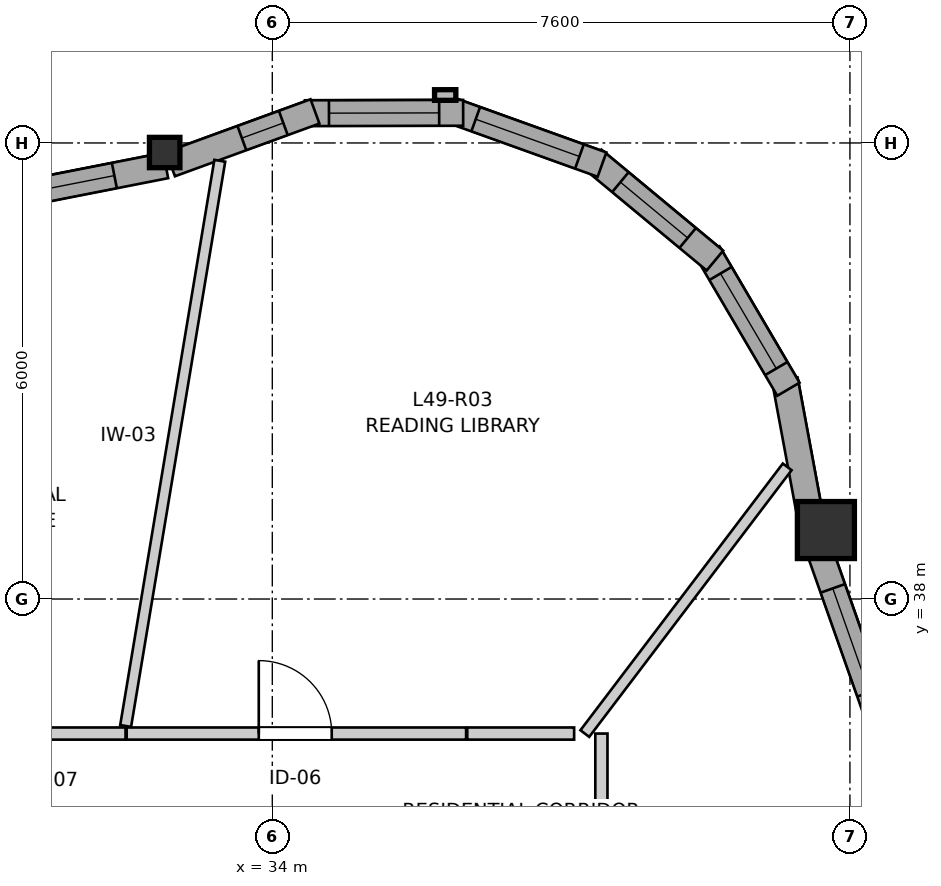
"""IFC4 building model, lengths in metres.
Left out: names, types, materials, properties, quantities, classifications, styles, units other than length and angle.
Written with IfcOpenShell. Run it as: python <this file> out.ifc"""

import sys

from ifc_helpers import new_model, si_unit, direction, frame, frame_2d, origin, origin_2d, place, context, subcontext, project, spatial, rectangle, i_section, extrude, source, transform, mapped, element, fill, save


model = new_model("IFC4")
c1 = context("Model", 3, precision=1e-05, world=origin(), true_north=direction((0.0, 1.0)))
c2 = subcontext(c1, "Body", "Model", "MODEL_VIEW")
j1 = project(units=[si_unit("LENGTHUNIT", "METRE"), si_unit("PLANEANGLEUNIT", "RADIAN")], contexts=[c1])
p1 = place(None, origin())
s1 = spatial("IfcSite", under=j1, at=p1, CompositionType="ELEMENT")
p2 = place(p1, origin())
s2 = spatial("IfcBuilding", under=s1, at=p2, CompositionType="ELEMENT")
p3 = place(p2, frame((0.0, 0.0, 165.0)))
s3 = spatial("IfcBuildingStorey", under=s2, at=p3, CompositionType="ELEMENT", Elevation=165.0)
m1 = source(origin(), c2, "Body", "SweptSolid", [
    extrude(rectangle(XDim=0.75, YDim=0.75, at=origin_2d()), origin(), (0.0, 0.0, 1.0), 2.95),
])
p4 = place(p3, frame((41.284, 38.907, 0.0), z_axis=(0.0, 0.0, 1.0), x_axis=(1.0, 0.0, 0.0)))
e1 = element("IfcColumn", 1, at=p4, inside=s3, PredefinedType="COLUMN", context=c2, shape_type="MappedRepresentation", body=[
    mapped(m1, transform((0.0, 0.0, 0.0), x_axis=(1.0, 0.0, 0.0), y_axis=(0.0, 1.0, 0.0), z_axis=(0.0, 0.0, 1.0), scale=1.0)),
])
m2 = source(origin(), c2, "Body", "SweptSolid", [
    extrude(i_section(OverallWidth=0.401, OverallDepth=0.399, WebThickness=0.023, FlangeThickness=0.036, FilletRadius=0.015, at=origin_2d()), origin(), (0.0, 0.0, 1.0), 2.95),
])
p5 = place(p3, frame((32.584, 43.874, 0.0), z_axis=(0.0, 0.0, 1.0), x_axis=(1.0, 0.0, 0.0)))
e2 = element("IfcColumn", 2, at=p5, inside=s3, PredefinedType="PILASTER", context=c2, shape_type="MappedRepresentation", body=[
    mapped(m2, transform((0.0, 0.0, 0.0), x_axis=(1.0, 0.0, 0.0), y_axis=(0.0, 1.0, 0.0), z_axis=(0.0, 0.0, 1.0), scale=1.0)),
])
p6 = place(p3, frame((42.059, 36.198, 0.0), z_axis=(0.0, 0.0, 1.0), x_axis=(-0.332714406781, 0.943027636668, 0.0)))
e3 = element("IfcWall", 3, at=p6, inside=s3, PredefinedType="SOLIDWALL", context=c2, shape_type="SweptSolid", body=[
    extrude(rectangle(XDim=2.658, YDim=0.34, at=frame_2d((1.329, 0.0))), origin(), (0.0, 0.0, 1.0), 2.53),
])
p7 = place(p6, frame((0.609, 0.0, 0.82)))
e4 = element("IfcOpeningElement", 4, at=p7, cuts=e3, PredefinedType="OPENING", context=c2, shape_type="SweptSolid", body=[
    extrude(rectangle(XDim=1.45, YDim=1.25, at=frame_2d((0.725, 0.625))), frame((0.0, 0.18, 0.0), z_axis=(0.0, -1.0, 0.0), x_axis=(1.0, 0.0, 0.0)), (0.0, 0.0, 1.0), 0.36),
])
p8 = place(p3, frame((41.088, 39.029, 0.0), z_axis=(0.0, 0.0, 1.0), x_axis=(-0.18244577317, 0.983215917209, 0.0)))
e5 = element("IfcWall", 5, at=p8, inside=s3, PredefinedType="SOLIDWALL", context=c2, shape_type="SweptSolid", body=[
    extrude(rectangle(XDim=1.888, YDim=0.34, at=frame_2d((0.944, 0.0))), origin(), (0.0, 0.0, 1.0), 2.53),
])
p9 = place(p3, frame((40.791, 40.76, 0.0), z_axis=(0.0, 0.0, 1.0), x_axis=(-0.506225227923, 0.862401309493, 0.0)))
e6 = element("IfcWall", 6, at=p9, inside=s3, PredefinedType="SOLIDWALL", context=c2, shape_type="SweptSolid", body=[
    extrude(rectangle(XDim=2.081, YDim=0.34, at=frame_2d((1.041, 0.0))), origin(), (0.0, 0.0, 1.0), 2.53),
])
p10 = place(p9, frame((0.315, 0.0, 0.82)))
e7 = element("IfcOpeningElement", 7, at=p10, cuts=e6, PredefinedType="OPENING", context=c2, shape_type="SweptSolid", body=[
    extrude(rectangle(XDim=1.45, YDim=1.25, at=frame_2d((0.725, 0.625))), frame((0.0, 0.18, 0.0), z_axis=(0.0, -1.0, 0.0), x_axis=(1.0, 0.0, 0.0)), (0.0, 0.0, 1.0), 0.36),
])
p11 = place(p3, frame((39.823, 42.453, 0.0), z_axis=(0.0, 0.0, 1.0), x_axis=(-0.769690471148, 0.63841724493, 0.0)))
e8 = element("IfcWall", 8, at=p11, inside=s3, PredefinedType="SOLIDWALL", context=c2, shape_type="SweptSolid", body=[
    extrude(rectangle(XDim=2.081, YDim=0.34, at=frame_2d((1.041, 0.0))), origin(), (0.0, 0.0, 1.0), 2.53),
])
p12 = place(p11, frame((0.466, 0.0, 0.82)))
e9 = element("IfcOpeningElement", 9, at=p12, cuts=e8, PredefinedType="OPENING", context=c2, shape_type="SweptSolid", body=[
    extrude(rectangle(XDim=1.15, YDim=1.2, at=frame_2d((0.575, 0.6))), frame((0.0, 0.18, 0.0), z_axis=(0.0, -1.0, 0.0), x_axis=(1.0, 0.0, 0.0)), (0.0, 0.0, 1.0), 0.36),
])
p13 = place(p3, frame((38.338, 43.715, 0.0), z_axis=(0.0, 0.0, 1.0), x_axis=(-0.941071215914, 0.338208466153, 0.0)))
e10 = element("IfcWall", 10, at=p13, inside=s3, PredefinedType="SOLIDWALL", context=c2, shape_type="SweptSolid", body=[
    extrude(rectangle(XDim=2.081, YDim=0.34, at=frame_2d((1.041, 0.0))), origin(), (0.0, 0.0, 1.0), 2.53),
])
p14 = place(p13, frame((0.315, 0.0, 0.82)))
e11 = element("IfcOpeningElement", 11, at=p14, cuts=e10, PredefinedType="OPENING", context=c2, shape_type="SweptSolid", body=[
    extrude(rectangle(XDim=1.45, YDim=1.25, at=frame_2d((0.725, 0.625))), frame((0.0, 0.18, 0.0), z_axis=(0.0, -1.0, 0.0), x_axis=(1.0, 0.0, 0.0)), (0.0, 0.0, 1.0), 0.36),
])
p15 = place(p3, frame((36.511, 44.396, 0.0), z_axis=(0.0, 0.0, 1.0), x_axis=(-0.999996965272, -0.002463624621, 0.0)))
e12 = element("IfcWall", 12, at=p15, inside=s3, PredefinedType="SOLIDWALL", context=c2, shape_type="SweptSolid", body=[
    extrude(rectangle(XDim=2.081, YDim=0.34, at=frame_2d((1.041, 0.0))), origin(), (0.0, 0.0, 1.0), 2.53),
])
p16 = place(p15, frame((0.316, 0.0, 0.82)))
e13 = element("IfcOpeningElement", 13, at=p16, cuts=e12, PredefinedType="OPENING", context=c2, shape_type="SweptSolid", body=[
    extrude(rectangle(XDim=1.45, YDim=1.25, at=frame_2d((0.725, 0.625))), frame((0.0, 0.18, 0.0), z_axis=(0.0, -1.0, 0.0), x_axis=(1.0, 0.0, 0.0)), (0.0, 0.0, 1.0), 0.36),
])
p17 = place(p3, frame((34.562, 44.415, 0.0), z_axis=(0.0, 0.0, 1.0), x_axis=(-0.939426417976, -0.342750645819, 0.0)))
e14 = element("IfcWall", 14, at=p17, inside=s3, PredefinedType="SOLIDWALL", context=c2, shape_type="SweptSolid", body=[
    extrude(rectangle(XDim=2.023, YDim=0.34, at=frame_2d((1.011, 0.0))), origin(), (0.0, 0.0, 1.0), 2.53),
])
p18 = place(p17, frame((0.444, 0.0, 0.82)))
e15 = element("IfcOpeningElement", 15, at=p18, cuts=e14, PredefinedType="OPENING", context=c2, shape_type="SweptSolid", body=[
    extrude(rectangle(XDim=0.58, YDim=1.35, at=frame_2d((0.29, 0.675))), frame((0.0, 0.18, 0.0), z_axis=(0.0, -1.0, 0.0), x_axis=(1.0, 0.0, 0.0)), (0.0, 0.0, 1.0), 0.36),
])
p19 = place(p3, frame((32.597, 43.704, 0.0), z_axis=(0.0, 0.0, 1.0), x_axis=(-0.981214876679, -0.192918028667, 0.0)))
e16 = element("IfcWall", 16, at=p19, inside=s3, PredefinedType="SOLIDWALL", context=c2, shape_type="SweptSolid", body=[
    extrude(rectangle(XDim=2.746, YDim=0.34, at=frame_2d((1.373, 0.0))), origin(), (0.0, 0.0, 1.0), 2.53),
])
p20 = place(p19, frame((0.688, 0.0, 0.82)))
e17 = element("IfcOpeningElement", 17, at=p20, cuts=e16, PredefinedType="OPENING", context=c2, shape_type="SweptSolid", body=[
    extrude(rectangle(XDim=1.35, YDim=1.45, at=frame_2d((0.675, 0.725))), frame((0.0, 0.18, 0.0), z_axis=(0.0, -1.0, 0.0), x_axis=(1.0, 0.0, 0.0)), (0.0, 0.0, 1.0), 0.36),
])
p21 = place(p3, frame((24.201, 36.23, 0.0), z_axis=(0.0, 0.0, 1.0), x_axis=(1.0, 0.0, 0.0)))
e18 = element("IfcWall", 18, at=p21, inside=s3, PredefinedType="PARTITIONING", context=c2, shape_type="SweptSolid", body=[
    extrude(rectangle(XDim=7.868, YDim=0.16, at=frame_2d((3.934, 0.0))), origin(), (0.0, 0.0, 1.0), 2.95),
])
p22 = place(p21, frame((3.456, 0.0, 0.0)))
e19 = element("IfcOpeningElement", 19, at=p22, cuts=e18, PredefinedType="OPENING", context=c2, shape_type="SweptSolid", body=[
    extrude(rectangle(XDim=0.96, YDim=2.1, at=frame_2d((0.48, 1.05))), frame((0.0, 0.09, 0.0), z_axis=(0.0, -1.0, 0.0), x_axis=(1.0, 0.0, 0.0)), (0.0, 0.0, 1.0), 0.18),
])
p23 = place(p3, frame((32.084, 36.23, 0.0), z_axis=(0.0, 0.0, 1.0), x_axis=(1.0, 0.0, 0.0)))
e20 = element("IfcWall", 20, at=p23, inside=s3, PredefinedType="PARTITIONING", context=c2, shape_type="SweptSolid", body=[
    extrude(rectangle(XDim=4.466, YDim=0.16, at=frame_2d((2.233, 0.0))), origin(), (0.0, 0.0, 1.0), 2.588),
])
p24 = place(p23, frame((1.738, 0.0, 0.0)))
e21 = element("IfcOpeningElement", 21, at=p24, cuts=e20, PredefinedType="OPENING", context=c2, shape_type="SweptSolid", body=[
    extrude(rectangle(XDim=0.96, YDim=2.1, at=frame_2d((0.48, 1.05))), frame((0.0, 0.09, 0.0), z_axis=(0.0, -1.0, 0.0), x_axis=(1.0, 0.0, 0.0)), (0.0, 0.0, 1.0), 0.18),
])
p25 = place(p3, frame((32.071, 36.33, 0.0), z_axis=(0.0, 0.0, 1.0), x_axis=(0.164299199522, 0.986410549942, 0.0)))
e22 = element("IfcWall", 22, at=p25, inside=s3, PredefinedType="PARTITIONING", context=c2, shape_type="SweptSolid", body=[
    extrude(rectangle(XDim=7.538, YDim=0.145, at=frame_2d((3.769, 0.0))), origin(), (0.0, 0.0, 1.0), 2.95),
])
p26 = place(p3, frame((38.112, 36.23, 0.0), z_axis=(0.0, 0.0, 1.0), x_axis=(0.604495658019, 0.796608435453, 0.0)))
e23 = element("IfcWall", 23, at=p26, inside=s3, PredefinedType="PARTITIONING", context=c2, shape_type="SweptSolid", body=[
    extrude(rectangle(XDim=4.405, YDim=0.145, at=frame_2d((2.202, 0.0))), origin(), (0.0, 0.0, 1.0), 2.95),
])
p27 = place(p3, frame((38.33, 34.465, 0.0), z_axis=(0.0, 0.0, 1.0), x_axis=(0.0, 1.0, 0.0)))
e24 = element("IfcWall", 24, at=p27, inside=s3, PredefinedType="PARTITIONING", context=c2, shape_type="SweptSolid", body=[
    extrude(rectangle(XDim=1.765, YDim=0.16, at=frame_2d((0.882, 0.0))), origin(), (0.0, 0.0, 1.0), 2.588),
])
p28 = place(p3, frame((36.565, 36.23, 0.0), z_axis=(0.0, 0.0, 1.0), x_axis=(1.0, 0.0, 0.0)))
e25 = element("IfcWall", 25, at=p28, inside=s3, PredefinedType="PARTITIONING", context=c2, shape_type="SweptSolid", body=[
    extrude(rectangle(XDim=1.406, YDim=0.16, at=frame_2d((0.703, 0.0))), origin(), (0.0, 0.0, 1.0), 2.95),
])
m3 = source(origin(), c2, "Body", "SweptSolid", [
    extrude(rectangle(XDim=1.45, YDim=1.25, at=frame_2d((0.725, 0.625))), frame((0.0, 0.03, 0.0), z_axis=(0.0, -1.0, 0.0), x_axis=(1.0, 0.0, 0.0)), (0.0, 0.0, 1.0), 0.06),
])
p29 = place(p7, origin())
e26 = element("IfcWindow", 26, at=p29, inside=s3, PartitioningType="SINGLE_PANEL", PredefinedType="WINDOW", context=c2, shape_type="MappedRepresentation", body=[
    mapped(m3, transform((0.0, 0.0, 0.0), x_axis=(1.0, 0.0, 0.0), y_axis=(0.0, 1.0, 0.0), z_axis=(0.0, 0.0, 1.0), scale=1.0)),
])
fill(e4, e26)
p30 = place(p10, origin())
e27 = element("IfcWindow", 27, at=p30, inside=s3, PartitioningType="SINGLE_PANEL", PredefinedType="WINDOW", context=c2, shape_type="MappedRepresentation", body=[
    mapped(m3, transform((0.0, 0.0, 0.0), x_axis=(1.0, 0.0, 0.0), y_axis=(0.0, 1.0, 0.0), z_axis=(0.0, 0.0, 1.0), scale=1.0)),
])
fill(e7, e27)
m4 = source(origin(), c2, "Body", "SweptSolid", [
    extrude(rectangle(XDim=1.15, YDim=1.2, at=frame_2d((0.575, 0.6))), frame((0.0, 0.03, 0.0), z_axis=(0.0, -1.0, 0.0), x_axis=(1.0, 0.0, 0.0)), (0.0, 0.0, 1.0), 0.06),
])
p31 = place(p12, origin())
e28 = element("IfcWindow", 28, at=p31, inside=s3, PartitioningType="SINGLE_PANEL", PredefinedType="WINDOW", context=c2, shape_type="MappedRepresentation", body=[
    mapped(m4, transform((0.0, 0.0, 0.0), x_axis=(1.0, 0.0, 0.0), y_axis=(0.0, 1.0, 0.0), z_axis=(0.0, 0.0, 1.0), scale=1.0)),
])
fill(e9, e28)
p32 = place(p14, origin())
e29 = element("IfcWindow", 29, at=p32, inside=s3, PartitioningType="SINGLE_PANEL", PredefinedType="WINDOW", context=c2, shape_type="MappedRepresentation", body=[
    mapped(m3, transform((0.0, 0.0, 0.0), x_axis=(1.0, 0.0, 0.0), y_axis=(0.0, 1.0, 0.0), z_axis=(0.0, 0.0, 1.0), scale=1.0)),
])
fill(e11, e29)
p33 = place(p16, origin())
e30 = element("IfcWindow", 30, at=p33, inside=s3, PartitioningType="SINGLE_PANEL", PredefinedType="WINDOW", context=c2, shape_type="MappedRepresentation", body=[
    mapped(m3, transform((0.0, 0.0, 0.0), x_axis=(1.0, 0.0, 0.0), y_axis=(0.0, 1.0, 0.0), z_axis=(0.0, 0.0, 1.0), scale=1.0)),
])
fill(e13, e30)
m5 = source(origin(), c2, "Body", "SweptSolid", [
    extrude(rectangle(XDim=0.58, YDim=1.35, at=frame_2d((0.29, 0.675))), frame((0.0, 0.03, 0.0), z_axis=(0.0, -1.0, 0.0), x_axis=(1.0, 0.0, 0.0)), (0.0, 0.0, 1.0), 0.06),
])
p34 = place(p18, origin())
e31 = element("IfcWindow", 31, at=p34, inside=s3, PartitioningType="SINGLE_PANEL", PredefinedType="WINDOW", context=c2, shape_type="MappedRepresentation", body=[
    mapped(m5, transform((0.0, 0.0, 0.0), x_axis=(1.0, 0.0, 0.0), y_axis=(0.0, 1.0, 0.0), z_axis=(0.0, 0.0, 1.0), scale=1.0)),
])
fill(e15, e31)
m6 = source(origin(), c2, "Body", "SweptSolid", [
    extrude(rectangle(XDim=1.35, YDim=1.45, at=frame_2d((0.675, 0.725))), frame((0.0, 0.03, 0.0), z_axis=(0.0, -1.0, 0.0), x_axis=(1.0, 0.0, 0.0)), (0.0, 0.0, 1.0), 0.06),
])
p35 = place(p20, origin())
e32 = element("IfcWindow", 32, at=p35, inside=s3, PartitioningType="SINGLE_PANEL", PredefinedType="WINDOW", context=c2, shape_type="MappedRepresentation", body=[
    mapped(m6, transform((0.0, 0.0, 0.0), x_axis=(1.0, 0.0, 0.0), y_axis=(0.0, 1.0, 0.0), z_axis=(0.0, 0.0, 1.0), scale=1.0)),
])
fill(e17, e32)
m7 = source(origin(), c2, "Body", "SweptSolid", [
    extrude(rectangle(XDim=0.96, YDim=2.1, at=frame_2d((0.48, 1.05))), frame((0.0, 0.025, 0.0), z_axis=(0.0, -1.0, 0.0), x_axis=(1.0, 0.0, 0.0)), (0.0, 0.0, 1.0), 0.05),
])
p36 = place(p24, origin())
e33 = element("IfcDoor", 33, at=p36, inside=s3, OperationType="SINGLE_SWING_LEFT", PredefinedType="DOOR", context=c2, shape_type="MappedRepresentation", body=[
    mapped(m7, transform((0.0, 0.0, 0.0), x_axis=(1.0, 0.0, 0.0), y_axis=(0.0, 1.0, 0.0), z_axis=(0.0, 0.0, 1.0), scale=1.0)),
])
fill(e21, e33)
save(model, sys.argv[1])
